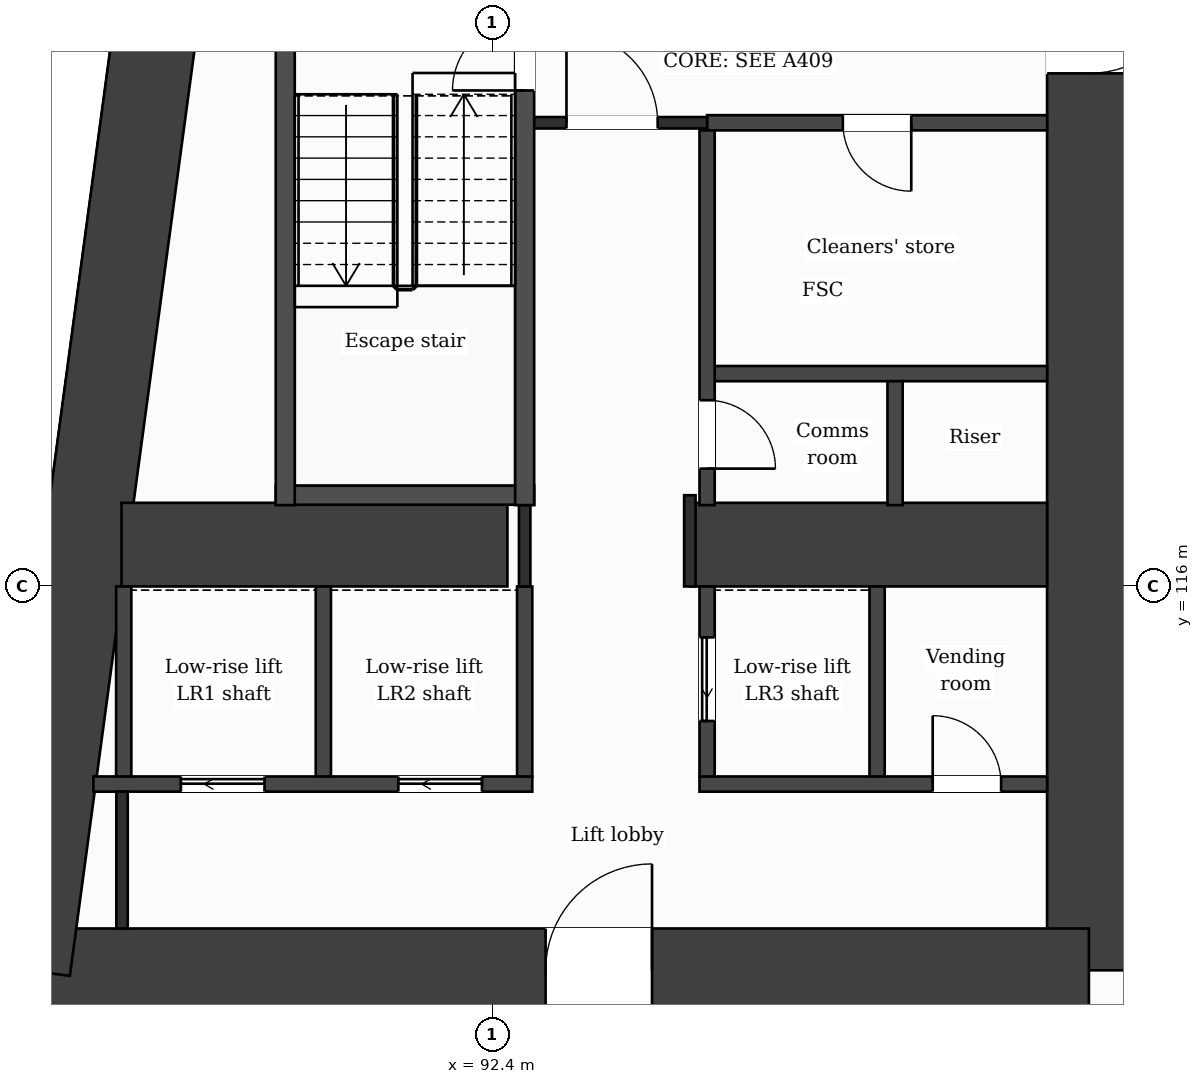
"""IFC4 building model, lengths in metres.
Left out: names, types, materials, properties, quantities, classifications, styles, units other than length and angle.
Written with IfcOpenShell. Run it as: python <this file> out.ifc"""

import sys

from ifc_helpers import new_model, si_unit, direction, frame, frame_2d, origin, place, context, subcontext, project, spatial, rectangle, extrude, element, fill, save


model = new_model("IFC4")
c1 = context("Model", 3, precision=1e-05, world=origin(), true_north=direction((0.0, 1.0)))
c2 = subcontext(c1, "Body", "Model", "MODEL_VIEW")
j1 = project(units=[si_unit("LENGTHUNIT", "METRE"), si_unit("PLANEANGLEUNIT", "RADIAN")], contexts=[c1])
p1 = place(None, origin())
s1 = spatial("IfcSite", under=j1, at=p1, CompositionType="ELEMENT")
p2 = place(p1, origin())
s2 = spatial("IfcBuilding", under=s1, at=p2, CompositionType="ELEMENT")
p3 = place(p2, frame((0.0, 0.0, 46.0)))
s3 = spatial("IfcBuildingStorey", under=s2, at=p3, CompositionType="ELEMENT", Elevation=46.0)
p4 = place(p3, frame((100.25, 131.85, 0.0), z_axis=(0.0, 0.0, 1.0), x_axis=(0.0, -1.0, 0.0)))
e1 = element("IfcWall", 1, at=p4, inside=s3, PredefinedType="SHEAR", context=c2, shape_type="SweptSolid", body=[
    extrude(rectangle(XDim=20.9, YDim=1.1, at=frame_2d((10.45, 0.0))), origin(), (0.0, 0.0, 1.0), 3.5),
])
p5 = place(p4, frame((7.7, 0.0, 0.0)))
e2 = element("IfcOpeningElement", 2, at=p5, cuts=e1, PredefinedType="OPENING", context=c2, shape_type="SweptSolid", body=[
    extrude(rectangle(XDim=1.4, YDim=2.1, at=frame_2d((0.7, 1.05))), frame((0.0, 0.56, 0.0), z_axis=(0.0, -1.0, 0.0), x_axis=(1.0, 0.0, 0.0)), (0.0, 0.0, 1.0), 1.12),
])
p6 = place(p3, frame((100.25, 110.95, 0.0), z_axis=(0.0, 0.0, 1.0), x_axis=(-1.0, 0.0, 0.0)))
e3 = element("IfcWall", 3, at=p6, inside=s3, PredefinedType="SHEAR", context=c2, shape_type="SweptSolid", body=[
    extrude(rectangle(XDim=13.952, YDim=1.1, at=frame_2d((6.976, 0.0))), origin(), (0.0, 0.0, 1.0), 3.5),
])
p7 = place(p6, frame((5.748, 0.0, 0.0)))
e4 = element("IfcOpeningElement", 4, at=p7, cuts=e3, PredefinedType="OPENING", context=c2, shape_type="SweptSolid", body=[
    extrude(rectangle(XDim=1.4, YDim=2.1, at=frame_2d((0.7, 1.05))), frame((0.0, 0.56, 0.0), z_axis=(0.0, -1.0, 0.0), x_axis=(1.0, 0.0, 0.0)), (0.0, 0.0, 1.0), 1.12),
])
p8 = place(p3, frame((86.298, 110.95, 0.0), z_axis=(0.0, 0.0, 1.0), x_axis=(0.133400422634, 0.99106222168, 0.0)))
e5 = element("IfcWall", 5, at=p8, inside=s3, PredefinedType="SHEAR", context=c2, shape_type="SweptSolid", body=[
    extrude(rectangle(XDim=21.089, YDim=1.1, at=frame_2d((10.544, 0.0))), origin(), (0.0, 0.0, 1.0), 3.5),
])
p9 = place(p3, frame((87.523, 116.55, 0.0), z_axis=(0.0, 0.0, 1.0), x_axis=(1.0, 0.0, 0.0)))
e6 = element("IfcWall", 6, at=p9, inside=s3, PredefinedType="SHEAR", context=c2, shape_type="SweptSolid", body=[
    extrude(rectangle(XDim=5.077, YDim=1.1, at=frame_2d((2.539, 0.0))), origin(), (0.0, 0.0, 1.0), 3.5),
])
p10 = place(p3, frame((95.0, 116.55, 0.0), z_axis=(0.0, 0.0, 1.0), x_axis=(1.0, 0.0, 0.0)))
e7 = element("IfcWall", 7, at=p10, inside=s3, PredefinedType="SHEAR", context=c2, shape_type="SweptSolid", body=[
    extrude(rectangle(XDim=4.7, YDim=1.1, at=frame_2d((2.35, 0.0))), origin(), (0.0, 0.0, 1.0), 3.5),
])
p11 = place(p3, frame((87.153, 113.4, 0.0), z_axis=(0.0, 0.0, 1.0), x_axis=(1.0, 0.0, 0.0)))
e8 = element("IfcWall", 8, at=p11, inside=s3, PredefinedType="PARTITIONING", context=c2, shape_type="SweptSolid", body=[
    extrude(rectangle(XDim=5.774, YDim=0.2, at=frame_2d((2.887, 0.0))), origin(), (0.0, 0.0, 1.0), 3.18),
])
p12 = place(p11, frame((1.151, 0.0, 0.0)))
e9 = element("IfcOpeningElement", 9, at=p12, cuts=e8, PredefinedType="OPENING", context=c2, shape_type="SweptSolid", body=[
    extrude(rectangle(XDim=1.1, YDim=2.1, at=frame_2d((0.55, 1.05))), frame((0.0, 0.11, 0.0), z_axis=(0.0, -1.0, 0.0), x_axis=(1.0, 0.0, 0.0)), (0.0, 0.0, 1.0), 0.22),
])
p13 = place(p11, frame((4.012, 0.0, 0.0)))
e10 = element("IfcOpeningElement", 10, at=p13, cuts=e8, PredefinedType="OPENING", context=c2, shape_type="SweptSolid", body=[
    extrude(rectangle(XDim=1.1, YDim=2.1, at=frame_2d((0.55, 1.05))), frame((0.0, 0.11, 0.0), z_axis=(0.0, -1.0, 0.0), x_axis=(1.0, 0.0, 0.0)), (0.0, 0.0, 1.0), 0.22),
])
p14 = place(p3, frame((95.127, 113.4, 0.0), z_axis=(0.0, 0.0, 1.0), x_axis=(1.0, 0.0, 0.0)))
e11 = element("IfcWall", 11, at=p14, inside=s3, PredefinedType="PARTITIONING", context=c2, shape_type="SweptSolid", body=[
    extrude(rectangle(XDim=4.573, YDim=0.2, at=frame_2d((2.287, 0.0))), origin(), (0.0, 0.0, 1.0), 3.18),
])
p15 = place(p14, frame((3.068, 0.0, 0.0)))
e12 = element("IfcOpeningElement", 12, at=p15, cuts=e11, PredefinedType="OPENING", context=c2, shape_type="SweptSolid", body=[
    extrude(rectangle(XDim=0.9, YDim=2.1, at=frame_2d((0.45, 1.05))), frame((0.0, 0.11, 0.0), z_axis=(0.0, -1.0, 0.0), x_axis=(1.0, 0.0, 0.0)), (0.0, 0.0, 1.0), 0.22),
])
p16 = place(p3, frame((89.552, 117.2, 0.0), z_axis=(0.0, 0.0, 1.0), x_axis=(1.0, 0.0, 0.0)))
e13 = element("IfcWall", 13, at=p16, inside=s3, PredefinedType="PARTITIONING", context=c2, shape_type="SweptSolid", body=[
    extrude(rectangle(XDim=3.4, YDim=0.25, at=frame_2d((1.7, 0.0))), origin(), (0.0, 0.0, 1.0), 3.18),
])
p17 = place(p3, frame((95.227, 118.8, 0.0), z_axis=(0.0, 0.0, 1.0), x_axis=(1.0, 0.0, 0.0)))
e14 = element("IfcWall", 14, at=p17, inside=s3, PredefinedType="PARTITIONING", context=c2, shape_type="SweptSolid", body=[
    extrude(rectangle(XDim=4.473, YDim=0.2, at=frame_2d((2.236, 0.0))), origin(), (0.0, 0.0, 1.0), 3.18),
])
p18 = place(p3, frame((95.227, 122.1, 0.0), z_axis=(0.0, 0.0, 1.0), x_axis=(1.0, 0.0, 0.0)))
e15 = element("IfcWall", 15, at=p18, inside=s3, PredefinedType="PARTITIONING", context=c2, shape_type="SweptSolid", body=[
    extrude(rectangle(XDim=4.473, YDim=0.2, at=frame_2d((2.236, 0.0))), origin(), (0.0, 0.0, 1.0), 3.18),
])
p19 = place(p18, frame((1.786, 0.0, 0.0)))
e16 = element("IfcOpeningElement", 16, at=p19, cuts=e15, PredefinedType="OPENING", context=c2, shape_type="SweptSolid", body=[
    extrude(rectangle(XDim=0.9, YDim=2.1, at=frame_2d((0.45, 1.05))), frame((0.0, 0.11, 0.0), z_axis=(0.0, -1.0, 0.0), x_axis=(1.0, 0.0, 0.0)), (0.0, 0.0, 1.0), 0.22),
])
p20 = place(p3, frame((92.827, 122.1, 0.0), z_axis=(0.0, 0.0, 1.0), x_axis=(1.0, 0.0, 0.0)))
e17 = element("IfcWall", 17, at=p20, inside=s3, PredefinedType="PARTITIONING", context=c2, shape_type="SweptSolid", body=[
    extrude(rectangle(XDim=2.4, YDim=0.15, at=frame_2d((1.2, 0.0))), origin(), (0.0, 0.0, 1.0), 3.18),
])
p21 = place(p20, frame((0.55, 0.0, 0.0)))
e18 = element("IfcOpeningElement", 18, at=p21, cuts=e17, PredefinedType="OPENING", context=c2, shape_type="SweptSolid", body=[
    extrude(rectangle(XDim=1.2, YDim=2.1, at=frame_2d((0.6, 1.05))), frame((0.0, 0.085, 0.0), z_axis=(0.0, -1.0, 0.0), x_axis=(1.0, 0.0, 0.0)), (0.0, 0.0, 1.0), 0.17),
])
p22 = place(p3, frame((87.552, 113.5, 0.0), z_axis=(0.0, 0.0, 1.0), x_axis=(0.0, 1.0, 0.0)))
e19 = element("IfcWall", 19, at=p22, inside=s3, PredefinedType="PARTITIONING", context=c2, shape_type="SweptSolid", body=[
    extrude(rectangle(XDim=2.5, YDim=0.2, at=frame_2d((1.25, 0.0))), origin(), (0.0, 0.0, 1.0), 3.18),
])
p23 = place(p3, frame((87.53, 111.5, 0.0), z_axis=(0.0, 0.0, 1.0), x_axis=(0.0, 1.0, 0.0)))
e20 = element("IfcWall", 20, at=p23, inside=s3, PredefinedType="PARTITIONING", context=c2, shape_type="SweptSolid", body=[
    extrude(rectangle(XDim=1.8, YDim=0.15, at=frame_2d((0.9, 0.0))), origin(), (0.0, 0.0, 1.0), 3.18),
])
p24 = place(p3, frame((89.677, 117.07, 0.0), z_axis=(0.0, 0.0, 1.0), x_axis=(0.0, 1.0, 0.0)))
e21 = element("IfcWall", 21, at=p24, inside=s3, PredefinedType="PARTITIONING", context=c2, shape_type="SweptSolid", body=[
    extrude(rectangle(XDim=6.755, YDim=0.25, at=frame_2d((3.377, 0.0))), origin(), (0.0, 0.0, 1.0), 3.18),
])
for number, where, z_axis, x_axis in (
    (22, (90.178, 113.5, 0.0), (0.0, 0.0, 1.0), (0.0, 1.0, 0.0)),
    (23, (92.827, 113.5, 0.0), (0.0, 0.0, 1.0), (0.0, 1.0, 0.0)),
):
    element("IfcWall", number, at=place(p3, frame(where, z_axis=z_axis, x_axis=x_axis)), inside=s3, PredefinedType="PARTITIONING", context=c2, shape_type="SweptSolid", body=[
        extrude(rectangle(XDim=2.5, YDim=0.2, at=frame_2d((1.25, 0.0))), origin(), (0.0, 0.0, 1.0), 3.18),
    ])
p25 = place(p3, frame((92.827, 116.0, 0.0), z_axis=(0.0, 0.0, 1.0), x_axis=(0.0, 1.0, 0.0)))
e24 = element("IfcWall", 24, at=p25, inside=s3, PredefinedType="PARTITIONING", context=c2, shape_type="SweptSolid", body=[
    extrude(rectangle(XDim=1.07, YDim=0.15, at=frame_2d((0.535, 0.0))), origin(), (0.0, 0.0, 1.0), 3.18),
])
p26 = place(p3, frame((92.827, 117.07, 0.0), z_axis=(0.0, 0.0, 1.0), x_axis=(0.0, 1.0, 0.0)))
e25 = element("IfcWall", 25, at=p26, inside=s3, PredefinedType="PARTITIONING", context=c2, shape_type="SweptSolid", body=[
    extrude(rectangle(XDim=6.755, YDim=0.25, at=frame_2d((3.377, 0.0))), origin(), (0.0, 0.0, 1.0), 3.18),
])
p27 = place(p26, frame((5.455, 0.0, 0.0)))
e26 = element("IfcOpeningElement", 26, at=p27, cuts=e25, PredefinedType="OPENING", context=c2, shape_type="SweptSolid", body=[
    extrude(rectangle(XDim=0.95, YDim=2.1, at=frame_2d((0.475, 1.05))), frame((0.0, 0.135, 0.0), z_axis=(0.0, -1.0, 0.0), x_axis=(1.0, 0.0, 0.0)), (0.0, 0.0, 1.0), 0.27),
])
p28 = place(p3, frame((95.0, 116.0, 0.0), z_axis=(0.0, 0.0, 1.0), x_axis=(0.0, 1.0, 0.0)))
e27 = element("IfcWall", 27, at=p28, inside=s3, PredefinedType="PARTITIONING", context=c2, shape_type="SweptSolid", body=[
    extrude(rectangle(XDim=1.2, YDim=0.15, at=frame_2d((0.6, 0.0))), origin(), (0.0, 0.0, 1.0), 3.18),
])
p29 = place(p3, frame((95.227, 113.5, 0.0), z_axis=(0.0, 0.0, 1.0), x_axis=(0.0, 1.0, 0.0)))
e28 = element("IfcWall", 28, at=p29, inside=s3, PredefinedType="PARTITIONING", context=c2, shape_type="SweptSolid", body=[
    extrude(rectangle(XDim=2.5, YDim=0.2, at=frame_2d((1.25, 0.0))), origin(), (0.0, 0.0, 1.0), 3.18),
])
p30 = place(p29, frame((0.73, 0.0, 0.0)))
e29 = element("IfcOpeningElement", 29, at=p30, cuts=e28, PredefinedType="OPENING", context=c2, shape_type="SweptSolid", body=[
    extrude(rectangle(XDim=1.1, YDim=2.1, at=frame_2d((0.55, 1.05))), frame((0.0, 0.11, 0.0), z_axis=(0.0, -1.0, 0.0), x_axis=(1.0, 0.0, 0.0)), (0.0, 0.0, 1.0), 0.22),
])
p31 = place(p3, frame((95.227, 117.07, 0.0), z_axis=(0.0, 0.0, 1.0), x_axis=(0.0, 1.0, 0.0)))
e30 = element("IfcWall", 30, at=p31, inside=s3, PredefinedType="PARTITIONING", context=c2, shape_type="SweptSolid", body=[
    extrude(rectangle(XDim=4.93, YDim=0.2, at=frame_2d((2.465, 0.0))), origin(), (0.0, 0.0, 1.0), 3.18),
])
p32 = place(p31, frame((0.48, 0.0, 0.0)))
e31 = element("IfcOpeningElement", 31, at=p32, cuts=e30, PredefinedType="OPENING", context=c2, shape_type="SweptSolid", body=[
    extrude(rectangle(XDim=0.9, YDim=2.1, at=frame_2d((0.45, 1.05))), frame((0.0, 0.11, 0.0), z_axis=(0.0, -1.0, 0.0), x_axis=(1.0, 0.0, 0.0)), (0.0, 0.0, 1.0), 0.22),
])
p33 = place(p3, frame((97.463, 113.5, 0.0), z_axis=(0.0, 0.0, 1.0), x_axis=(0.0, 1.0, 0.0)))
e32 = element("IfcWall", 32, at=p33, inside=s3, PredefinedType="PARTITIONING", context=c2, shape_type="SweptSolid", body=[
    extrude(rectangle(XDim=2.5, YDim=0.2, at=frame_2d((1.25, 0.0))), origin(), (0.0, 0.0, 1.0), 3.18),
])
p34 = place(p3, frame((97.7, 117.07, 0.0), z_axis=(0.0, 0.0, 1.0), x_axis=(0.0, 1.0, 0.0)))
e33 = element("IfcWall", 33, at=p34, inside=s3, PredefinedType="PARTITIONING", context=c2, shape_type="SweptSolid", body=[
    extrude(rectangle(XDim=1.63, YDim=0.2, at=frame_2d((0.815, 0.0))), origin(), (0.0, 0.0, 1.0), 3.18),
])
p35 = place(p21, origin())
e34 = element("IfcDoor", 34, at=p35, inside=s3, OperationType="SINGLE_SWING_LEFT", PredefinedType="DOOR", context=c2, shape_type="SweptSolid", body=[
    extrude(rectangle(XDim=1.2, YDim=2.1, at=frame_2d((0.6, 1.05))), frame((0.0, 0.025, 0.0), z_axis=(0.0, -1.0, 0.0), x_axis=(1.0, 0.0, 0.0)), (0.0, 0.0, 1.0), 0.05),
])
fill(e18, e34)
p36 = place(p19, origin())
e35 = element("IfcDoor", 35, at=p36, inside=s3, OperationType="SINGLE_SWING_RIGHT", PredefinedType="DOOR", context=c2, shape_type="SweptSolid", body=[
    extrude(rectangle(XDim=0.9, YDim=2.1, at=frame_2d((0.45, 1.05))), frame((0.0, 0.025, 0.0), z_axis=(0.0, -1.0, 0.0), x_axis=(1.0, 0.0, 0.0)), (0.0, 0.0, 1.0), 0.05),
])
fill(e16, e35)
p37 = place(p27, origin())
e36 = element("IfcDoor", 36, at=p37, inside=s3, OperationType="SINGLE_SWING_LEFT", PredefinedType="DOOR", context=c2, shape_type="SweptSolid", body=[
    extrude(rectangle(XDim=0.95, YDim=2.1, at=frame_2d((0.475, 1.05))), frame((0.0, 0.025, 0.0), z_axis=(0.0, -1.0, 0.0), x_axis=(1.0, 0.0, 0.0)), (0.0, 0.0, 1.0), 0.05),
])
fill(e26, e36)
p38 = place(p32, origin())
e37 = element("IfcDoor", 37, at=p38, inside=s3, OperationType="SINGLE_SWING_LEFT", PredefinedType="DOOR", context=c2, shape_type="SweptSolid", body=[
    extrude(rectangle(XDim=0.9, YDim=2.1, at=frame_2d((0.45, 1.05))), frame((0.0, 0.025, 0.0), z_axis=(0.0, -1.0, 0.0), x_axis=(1.0, 0.0, 0.0)), (0.0, 0.0, 1.0), 0.05),
])
fill(e31, e37)
p39 = place(p12, origin())
e38 = element("IfcDoor", 38, at=p39, inside=s3, OperationType="SLIDING_TO_LEFT", PredefinedType="DOOR", context=c2, shape_type="SweptSolid", body=[
    extrude(rectangle(XDim=1.1, YDim=2.1, at=frame_2d((0.55, 1.05))), frame((0.0, 0.025, 0.0), z_axis=(0.0, -1.0, 0.0), x_axis=(1.0, 0.0, 0.0)), (0.0, 0.0, 1.0), 0.05),
])
fill(e9, e38)
p40 = place(p13, origin())
e39 = element("IfcDoor", 39, at=p40, inside=s3, OperationType="SLIDING_TO_LEFT", PredefinedType="DOOR", context=c2, shape_type="SweptSolid", body=[
    extrude(rectangle(XDim=1.1, YDim=2.1, at=frame_2d((0.55, 1.05))), frame((0.0, 0.025, 0.0), z_axis=(0.0, -1.0, 0.0), x_axis=(1.0, 0.0, 0.0)), (0.0, 0.0, 1.0), 0.05),
])
fill(e10, e39)
p41 = place(p30, origin())
e40 = element("IfcDoor", 40, at=p41, inside=s3, OperationType="SLIDING_TO_LEFT", PredefinedType="DOOR", context=c2, shape_type="SweptSolid", body=[
    extrude(rectangle(XDim=1.1, YDim=2.1, at=frame_2d((0.55, 1.05))), frame((0.0, 0.025, 0.0), z_axis=(0.0, -1.0, 0.0), x_axis=(1.0, 0.0, 0.0)), (0.0, 0.0, 1.0), 0.05),
])
fill(e29, e40)
p42 = place(p15, origin())
e41 = element("IfcDoor", 41, at=p42, inside=s3, OperationType="SINGLE_SWING_LEFT", PredefinedType="DOOR", context=c2, shape_type="SweptSolid", body=[
    extrude(rectangle(XDim=0.9, YDim=2.1, at=frame_2d((0.45, 1.05))), frame((0.0, 0.025, 0.0), z_axis=(0.0, -1.0, 0.0), x_axis=(1.0, 0.0, 0.0)), (0.0, 0.0, 1.0), 0.05),
])
fill(e12, e41)
p43 = place(p7, origin())
e42 = element("IfcDoor", 42, at=p43, inside=s3, OperationType="SINGLE_SWING_LEFT", PredefinedType="DOOR", context=c2, shape_type="SweptSolid", body=[
    extrude(rectangle(XDim=1.4, YDim=2.1, at=frame_2d((0.7, 1.05))), frame((0.0, 0.025, 0.0), z_axis=(0.0, -1.0, 0.0), x_axis=(1.0, 0.0, 0.0)), (0.0, 0.0, 1.0), 0.05),
])
fill(e4, e42)
p44 = place(p5, origin())
e43 = element("IfcDoor", 43, at=p44, inside=s3, OperationType="SINGLE_SWING_LEFT", PredefinedType="DOOR", context=c2, shape_type="SweptSolid", body=[
    extrude(rectangle(XDim=1.4, YDim=2.1, at=frame_2d((0.7, 1.05))), frame((0.0, 0.025, 0.0), z_axis=(0.0, -1.0, 0.0), x_axis=(1.0, 0.0, 0.0)), (0.0, 0.0, 1.0), 0.05),
])
fill(e2, e43)
save(model, sys.argv[1])
